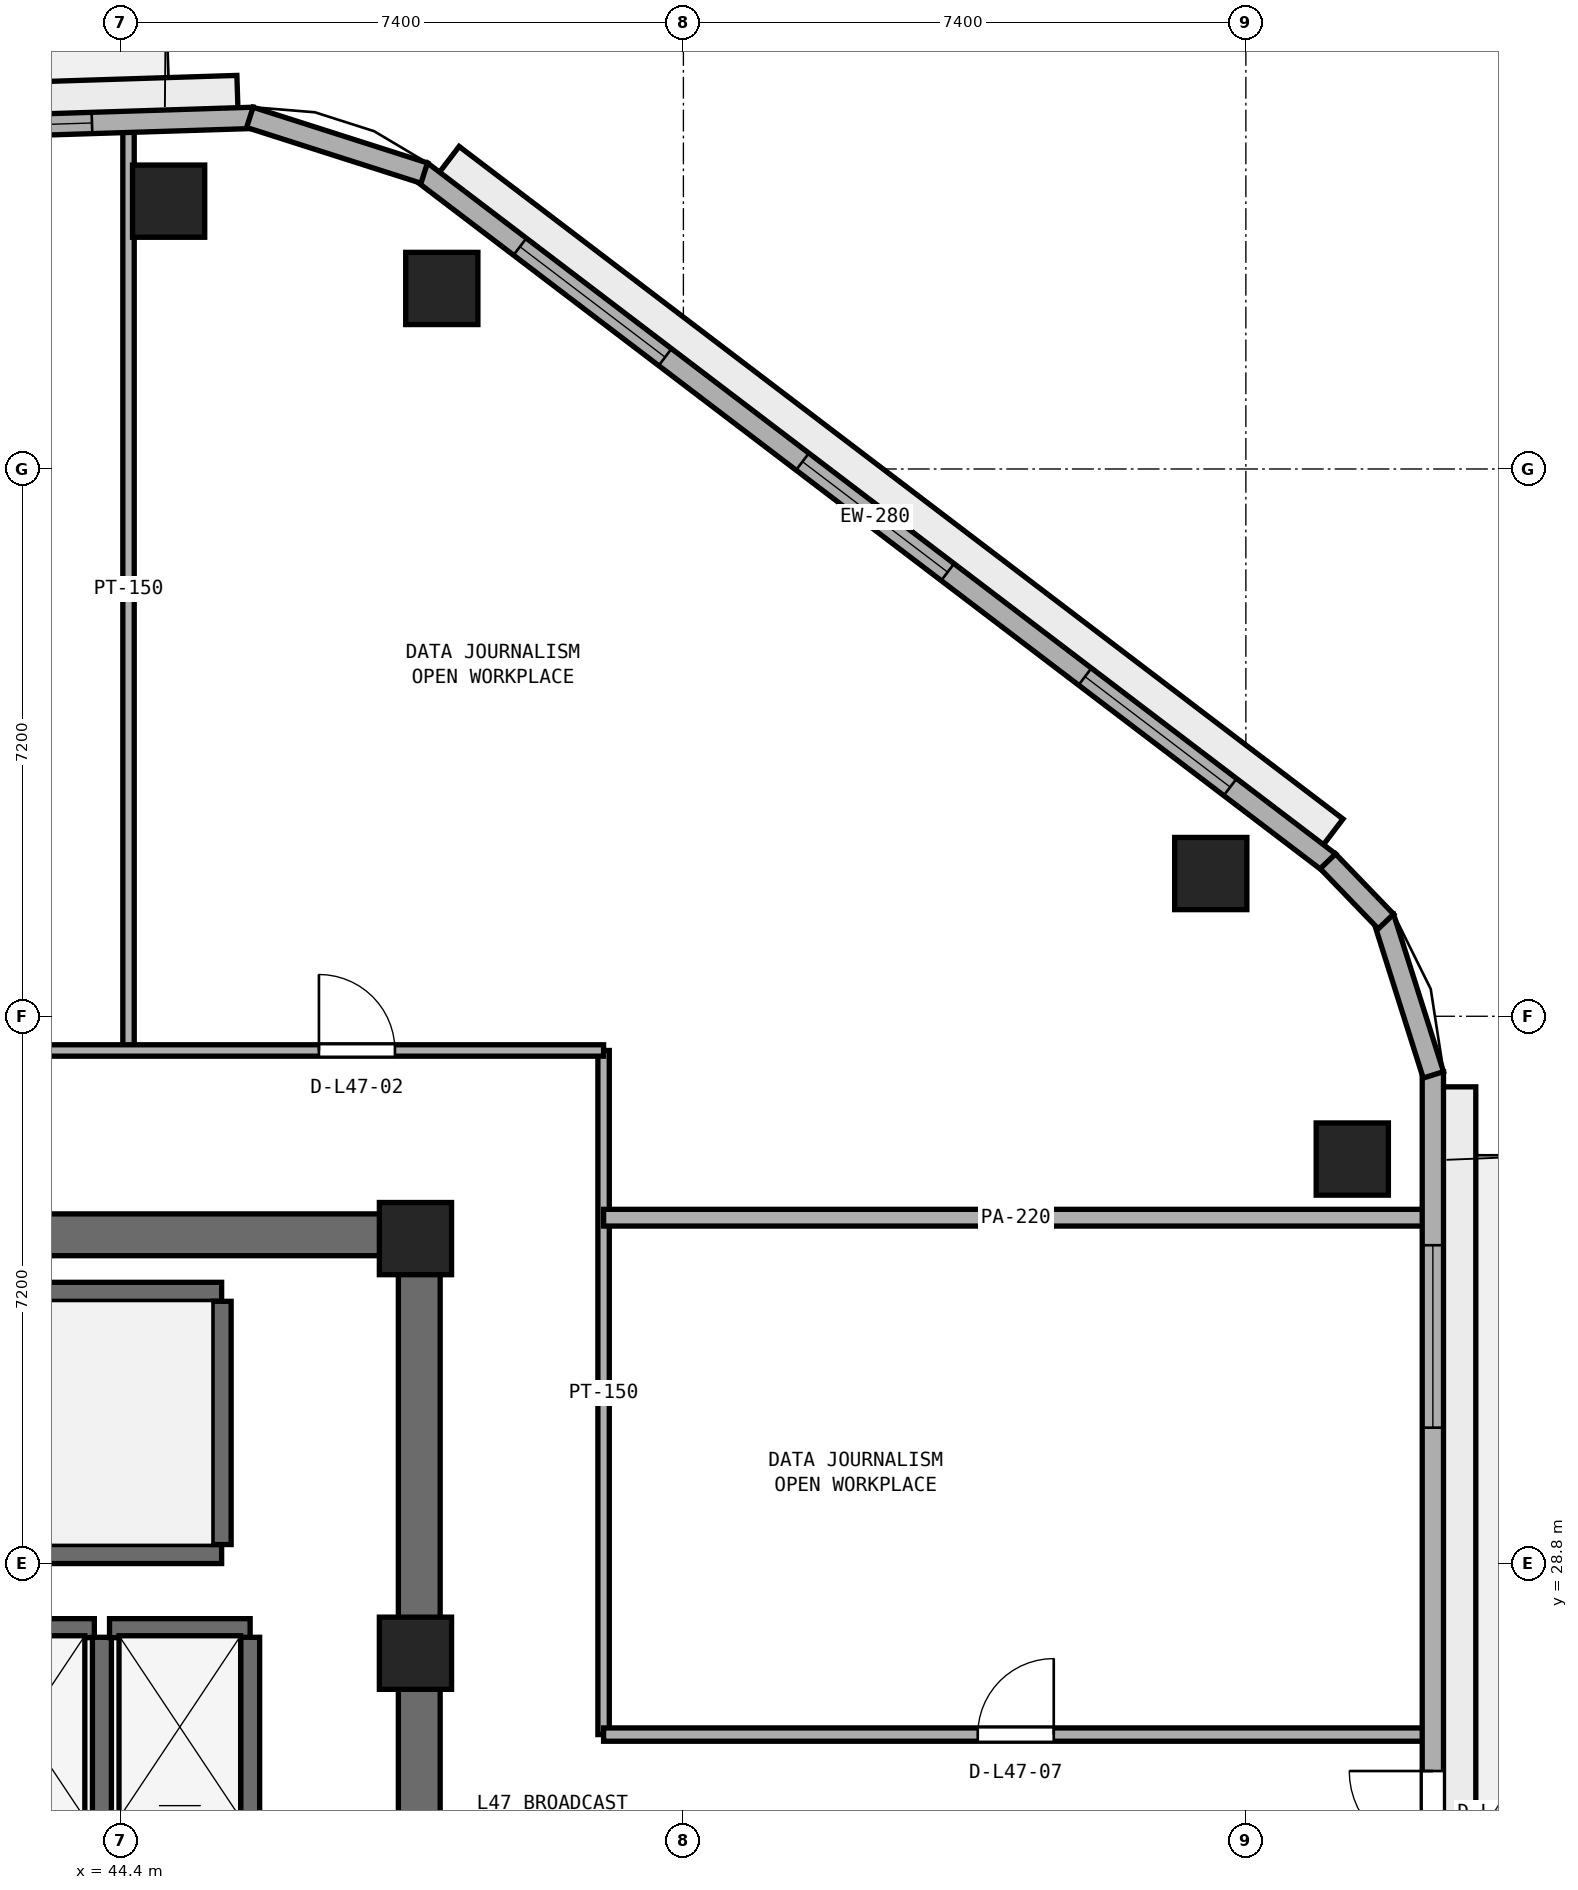
"""IFC4 building model, lengths in metres.
Left out: names, types, materials, properties, quantities, classifications, styles, units other than length and angle.
Written with IfcOpenShell. Run it as: python <this file> out.ifc"""

import sys

from ifc_helpers import new_model, si_unit, direction, frame, frame_2d, origin, origin_2d, place, context, subcontext, project, spatial, rectangle, extrude, element, fill, save


model = new_model("IFC4")
c1 = context("Model", 3, precision=1e-05, world=origin(), true_north=direction((0.0, 1.0)))
c2 = subcontext(c1, "Body", "Model", "MODEL_VIEW")
j1 = project(units=[si_unit("LENGTHUNIT", "METRE"), si_unit("PLANEANGLEUNIT", "RADIAN")], contexts=[c1])
p1 = place(None, origin())
s1 = spatial("IfcSite", under=j1, at=p1, CompositionType="ELEMENT")
p2 = place(p1, origin())
s2 = spatial("IfcBuilding", under=s1, at=p2, CompositionType="ELEMENT")
p3 = place(p2, frame((0.0, 0.0, 185.8)))
s3 = spatial("IfcBuildingStorey", under=s2, at=p3, CompositionType="ELEMENT", Elevation=185.8)
p4 = place(p3, frame((25.4, 33.125, 0.0), z_axis=(0.0, 0.0, 1.0), x_axis=(1.0, 0.0, 0.0)))
e1 = element("IfcWall", 1, at=p4, inside=s3, PredefinedType="SHEAR", context=c2, shape_type="SweptSolid", body=[
    extrude(rectangle(XDim=23.2, YDim=0.55, at=frame_2d((11.6, 0.0))), origin(), (0.0, 0.0, 1.0), 3.54),
])
p5 = place(p3, frame((48.325, 17.55, 0.0), z_axis=(0.0, 0.0, 1.0), x_axis=(0.0, 1.0, 0.0)))
e2 = element("IfcWall", 2, at=p5, inside=s3, PredefinedType="SHEAR", context=c2, shape_type="SweptSolid", body=[
    extrude(rectangle(XDim=15.3, YDim=0.55, at=frame_2d((7.65, 0.0))), origin(), (0.0, 0.0, 1.0), 3.54),
])
p6 = place(p5, frame((5.75, 0.0, 0.0)))
e3 = element("IfcOpeningElement", 3, at=p6, cuts=e2, PredefinedType="OPENING", context=c2, shape_type="SweptSolid", body=[
    extrude(rectangle(XDim=1.5, YDim=2.15, at=frame_2d((0.75, 1.075))), frame((0.0, 0.285, 0.0), z_axis=(0.0, -1.0, 0.0), x_axis=(1.0, 0.0, 0.0)), (0.0, 0.0, 1.0), 0.57),
])
for number, where, z_axis, x_axis in (
    (4, (48.275, 27.62, 0.0), (0.0, 0.0, 1.0), (1.0, 0.0, 0.0)),
    (5, (48.275, 33.075, 0.0), (0.0, 0.0, 1.0), (1.0, 0.0, 0.0)),
):
    element("IfcColumn", number, at=place(p3, frame(where, z_axis=z_axis, x_axis=x_axis)), inside=s3, PredefinedType="PILASTER", context=c2, shape_type="SweptSolid", body=[
        extrude(rectangle(XDim=0.95, YDim=0.95, at=origin_2d()), origin(), (0.0, 0.0, 1.0), 3.8),
    ])
for number, where, z_axis, x_axis in (
    (6, (60.6, 34.122, 0.0), (0.0, 0.0, 1.0), (1.0, 0.0, 0.0)),
    (7, (58.738, 37.878, 0.0), (0.0, 0.0, 1.0), (1.0, 0.0, 0.0)),
    (8, (48.622, 45.575, 0.0), (0.0, 0.0, 1.0), (1.0, 0.0, 0.0)),
    (9, (45.028, 46.724, 0.0), (0.0, 0.0, 1.0), (1.0, 0.0, 0.0)),
):
    element("IfcColumn", number, at=place(p3, frame(where, z_axis=z_axis, x_axis=x_axis)), inside=s3, PredefinedType="COLUMN", context=c2, shape_type="SweptSolid", body=[
        extrude(rectangle(XDim=0.95, YDim=0.95, at=origin_2d()), origin(), (0.0, 0.0, 1.0), 3.8),
    ])
for number, where, z_axis, x_axis in (
    (10, (38.425, 28.925, 0.0), (0.0, 0.0, 1.0), (1.0, 0.0, 0.0)),
    (11, (38.425, 32.375, 0.0), (0.0, 0.0, 1.0), (1.0, 0.0, 0.0)),
):
    element("IfcWall", number, at=place(p3, frame(where, z_axis=z_axis, x_axis=x_axis)), inside=s3, PredefinedType="SHEAR", context=c2, shape_type="SweptSolid", body=[
        extrude(rectangle(XDim=7.3, YDim=0.25, at=frame_2d((3.65, 0.0))), origin(), (0.0, 0.0, 1.0), 3.54),
    ])
p7 = place(p3, frame((45.725, 29.05, 0.0), z_axis=(0.0, 0.0, 1.0), x_axis=(0.0, 1.0, 0.0)))
e12 = element("IfcWall", 12, at=p7, inside=s3, PredefinedType="SHEAR", context=c2, shape_type="SweptSolid", body=[
    extrude(rectangle(XDim=3.2, YDim=0.25, at=frame_2d((1.6, 0.0))), origin(), (0.0, 0.0, 1.0), 3.54),
])
p8 = place(p3, frame((42.2, 27.95, 0.0), z_axis=(0.0, 0.0, 1.0), x_axis=(1.0, 0.0, 0.0)))
e13 = element("IfcWall", 13, at=p8, inside=s3, PredefinedType="SHEAR", context=c2, shape_type="SweptSolid", body=[
    extrude(rectangle(XDim=1.85, YDim=0.25, at=frame_2d((0.925, 0.0))), origin(), (0.0, 0.0, 1.0), 3.54),
])
p9 = place(p3, frame((44.15, 25.47, 0.0), z_axis=(0.0, 0.0, 1.0), x_axis=(0.0, 1.0, 0.0)))
e14 = element("IfcWall", 14, at=p9, inside=s3, PredefinedType="SHEAR", context=c2, shape_type="SweptSolid", body=[
    extrude(rectangle(XDim=2.36, YDim=0.25, at=frame_2d((1.18, 0.0))), origin(), (0.0, 0.0, 1.0), 3.54),
])
p10 = place(p3, frame((44.25, 27.95, 0.0), z_axis=(0.0, 0.0, 1.0), x_axis=(1.0, 0.0, 0.0)))
e15 = element("IfcWall", 15, at=p10, inside=s3, PredefinedType="SHEAR", context=c2, shape_type="SweptSolid", body=[
    extrude(rectangle(XDim=1.85, YDim=0.25, at=frame_2d((0.925, 0.0))), origin(), (0.0, 0.0, 1.0), 3.54),
])
p11 = place(p3, frame((46.1, 25.47, 0.0), z_axis=(0.0, 0.0, 1.0), x_axis=(0.0, 1.0, 0.0)))
e16 = element("IfcWall", 16, at=p11, inside=s3, PredefinedType="SHEAR", context=c2, shape_type="SweptSolid", body=[
    extrude(rectangle(XDim=2.36, YDim=0.25, at=frame_2d((1.18, 0.0))), origin(), (0.0, 0.0, 1.0), 3.54),
])
p12 = place(p3, frame((50.75, 26.55, 0.0), z_axis=(0.0, 0.0, 1.0), x_axis=(0.0, 1.0, 0.0)))
e17 = element("IfcWall", 17, at=p12, inside=s3, PredefinedType="PARTITIONING", context=c2, shape_type="SweptSolid", body=[
    extrude(rectangle(XDim=9.0, YDim=0.15, at=frame_2d((4.5, 0.0))), origin(), (0.0, 0.0, 1.0), 3.54),
])
p13 = place(p3, frame((44.5, 35.55, 0.0), z_axis=(0.0, 0.0, 1.0), x_axis=(0.0, 1.0, 0.0)))
e18 = element("IfcWall", 18, at=p13, inside=s3, PredefinedType="PARTITIONING", context=c2, shape_type="SweptSolid", body=[
    extrude(rectangle(XDim=12.152, YDim=0.15, at=frame_2d((6.076, 0.0))), origin(), (0.0, 0.0, 1.0), 3.54),
])
p14 = place(p3, frame((50.75, 26.55, 0.0), z_axis=(0.0, 0.0, 1.0), x_axis=(1.0, 0.0, 0.0)))
e19 = element("IfcWall", 19, at=p14, inside=s3, PredefinedType="PARTITIONING", context=c2, shape_type="SweptSolid", body=[
    extrude(rectangle(XDim=10.845, YDim=0.175, at=frame_2d((5.422, 0.0))), origin(), (0.0, 0.0, 1.0), 3.54),
])
p15 = place(p14, frame((4.923, 0.0, 0.0)))
e20 = element("IfcOpeningElement", 20, at=p15, cuts=e19, PredefinedType="OPENING", context=c2, shape_type="SweptSolid", body=[
    extrude(rectangle(XDim=1.0, YDim=2.12, at=frame_2d((0.5, 1.06))), frame((0.0, 0.097, 0.0), z_axis=(0.0, -1.0, 0.0), x_axis=(1.0, 0.0, 0.0)), (0.0, 0.0, 1.0), 0.195),
])
p16 = place(p3, frame((50.75, 33.35, 0.0), z_axis=(0.0, 0.0, 1.0), x_axis=(1.0, 0.0, 0.0)))
e21 = element("IfcWall", 21, at=p16, inside=s3, PredefinedType="PARTITIONING", context=c2, shape_type="SweptSolid", body=[
    extrude(rectangle(XDim=10.845, YDim=0.22, at=frame_2d((5.422, 0.0))), origin(), (0.0, 0.0, 1.0), 2.923),
])
p17 = place(p3, frame((23.25, 35.55, 0.0), z_axis=(0.0, 0.0, 1.0), x_axis=(1.0, 0.0, 0.0)))
e22 = element("IfcWall", 22, at=p17, inside=s3, PredefinedType="PARTITIONING", context=c2, shape_type="SweptSolid", body=[
    extrude(rectangle(XDim=27.5, YDim=0.15, at=frame_2d((13.75, 0.0))), origin(), (0.0, 0.0, 1.0), 3.54),
])
p18 = place(p17, frame((10.245, 0.0, 0.0)))
e23 = element("IfcOpeningElement", 23, at=p18, cuts=e22, PredefinedType="OPENING", context=c2, shape_type="SweptSolid", body=[
    extrude(rectangle(XDim=1.0, YDim=2.12, at=frame_2d((0.5, 1.06))), frame((0.0, 0.085, 0.0), z_axis=(0.0, -1.0, 0.0), x_axis=(1.0, 0.0, 0.0)), (0.0, 0.0, 1.0), 0.17),
])
p19 = place(p17, frame((23.755, 0.0, 0.0)))
e24 = element("IfcOpeningElement", 24, at=p19, cuts=e22, PredefinedType="OPENING", context=c2, shape_type="SweptSolid", body=[
    extrude(rectangle(XDim=1.0, YDim=2.12, at=frame_2d((0.5, 1.06))), frame((0.0, 0.085, 0.0), z_axis=(0.0, -1.0, 0.0), x_axis=(1.0, 0.0, 0.0)), (0.0, 0.0, 1.0), 0.17),
])
p20 = place(p3, frame((61.66, 16.369, 0.0), z_axis=(0.0, 0.0, 1.0), x_axis=(0.0, 1.0, 0.0)))
e25 = element("IfcWall", 25, at=p20, inside=s3, PredefinedType="STANDARD", context=c2, shape_type="SweptSolid", body=[
    extrude(rectangle(XDim=18.902, YDim=0.28, at=frame_2d((9.451, 0.0))), origin(), (0.0, 0.0, 1.0), 3.54),
])
p21 = place(p20, frame((8.601, 0.0, 0.0)))
e26 = element("IfcOpeningElement", 26, at=p21, cuts=e25, PredefinedType="OPENING", context=c2, shape_type="SweptSolid", body=[
    extrude(rectangle(XDim=1.1, YDim=2.2, at=frame_2d((0.55, 1.1))), frame((0.0, 0.15, 0.0), z_axis=(0.0, -1.0, 0.0), x_axis=(1.0, 0.0, 0.0)), (0.0, 0.0, 1.0), 0.3),
])
p22 = place(p20, frame((14.219, 0.0, 0.9)))
e27 = element("IfcOpeningElement", 27, at=p22, cuts=e25, PredefinedType="OPENING", context=c2, shape_type="SweptSolid", body=[
    extrude(rectangle(XDim=2.4, YDim=1.75, at=frame_2d((1.2, 0.875))), frame((0.0, 0.15, 0.0), z_axis=(0.0, -1.0, 0.0), x_axis=(1.0, 0.0, 0.0)), (0.0, 0.0, 1.0), 0.3),
])
p23 = place(p3, frame((60.295, 38.025, 0.0), z_axis=(0.0, 0.0, 1.0), x_axis=(-0.795831760834, 0.605517801925, 0.0)))
e28 = element("IfcWall", 28, at=p23, inside=s3, PredefinedType="STANDARD", context=c2, shape_type="SweptSolid", body=[
    extrude(rectangle(XDim=15.012, YDim=0.28, at=frame_2d((7.506, 0.0))), origin(), (0.0, 0.0, 1.0), 3.54),
])
p24 = place(p23, frame((1.635, 0.0, 0.9)))
e29 = element("IfcOpeningElement", 29, at=p24, cuts=e28, PredefinedType="OPENING", context=c2, shape_type="SweptSolid", body=[
    extrude(rectangle(XDim=2.4, YDim=1.75, at=frame_2d((1.2, 0.875))), frame((0.0, 0.15, 0.0), z_axis=(0.0, -1.0, 0.0), x_axis=(1.0, 0.0, 0.0)), (0.0, 0.0, 1.0), 0.3),
])
p25 = place(p23, frame((6.306, 0.0, 0.9)))
e30 = element("IfcOpeningElement", 30, at=p25, cuts=e28, PredefinedType="OPENING", context=c2, shape_type="SweptSolid", body=[
    extrude(rectangle(XDim=2.4, YDim=1.75, at=frame_2d((1.2, 0.875))), frame((0.0, 0.15, 0.0), z_axis=(0.0, -1.0, 0.0), x_axis=(1.0, 0.0, 0.0)), (0.0, 0.0, 1.0), 0.3),
])
p26 = place(p23, frame((10.977, 0.0, 0.9)))
e31 = element("IfcOpeningElement", 31, at=p26, cuts=e28, PredefinedType="OPENING", context=c2, shape_type="SweptSolid", body=[
    extrude(rectangle(XDim=2.4, YDim=1.75, at=frame_2d((1.2, 0.875))), frame((0.0, 0.15, 0.0), z_axis=(0.0, -1.0, 0.0), x_axis=(1.0, 0.0, 0.0)), (0.0, 0.0, 1.0), 0.3),
])
p27 = place(p3, frame((46.143, 47.82, 0.0), z_axis=(0.0, 0.0, 1.0), x_axis=(-0.999497065256, -0.031711457627, 0.0)))
e32 = element("IfcWall", 32, at=p27, inside=s3, PredefinedType="STANDARD", context=c2, shape_type="SweptSolid", body=[
    extrude(rectangle(XDim=16.452, YDim=0.28, at=frame_2d((8.226, 0.0))), origin(), (0.0, 0.0, 1.0), 3.54),
])
p28 = place(p27, frame((7.676, 0.0, 0.0)))
e33 = element("IfcOpeningElement", 33, at=p28, cuts=e32, PredefinedType="OPENING", context=c2, shape_type="SweptSolid", body=[
    extrude(rectangle(XDim=1.1, YDim=2.2, at=frame_2d((0.55, 1.1))), frame((0.0, 0.15, 0.0), z_axis=(0.0, -1.0, 0.0), x_axis=(1.0, 0.0, 0.0)), (0.0, 0.0, 1.0), 0.3),
])
p29 = place(p27, frame((2.125, 0.0, 0.9)))
e34 = element("IfcOpeningElement", 34, at=p29, cuts=e32, PredefinedType="OPENING", context=c2, shape_type="SweptSolid", body=[
    extrude(rectangle(XDim=2.4, YDim=1.75, at=frame_2d((1.2, 0.875))), frame((0.0, 0.15, 0.0), z_axis=(0.0, -1.0, 0.0), x_axis=(1.0, 0.0, 0.0)), (0.0, 0.0, 1.0), 0.3),
])
p30 = place(p27, frame((12.177, 0.0, 0.9)))
e35 = element("IfcOpeningElement", 35, at=p30, cuts=e32, PredefinedType="OPENING", context=c2, shape_type="SweptSolid", body=[
    extrude(rectangle(XDim=2.4, YDim=1.75, at=frame_2d((1.2, 0.875))), frame((0.0, 0.15, 0.0), z_axis=(0.0, -1.0, 0.0), x_axis=(1.0, 0.0, 0.0)), (0.0, 0.0, 1.0), 0.3),
])
p31 = place(p3, frame((61.667, 35.229, 0.0), z_axis=(0.0, 0.0, 1.0), x_axis=(-0.302044777107, 0.953293738898, 0.0)))
e36 = element("IfcWall", 36, at=p31, inside=s3, PredefinedType="STANDARD", context=c2, shape_type="SweptSolid", body=[
    extrude(rectangle(XDim=2.174, YDim=0.28, at=frame_2d((1.087, 0.0))), origin(), (0.0, 0.0, 1.0), 3.54),
])
p32 = place(p3, frame((61.042, 37.247, 0.0), z_axis=(0.0, 0.0, 1.0), x_axis=(-0.694004126367, 0.719971022045, 0.0)))
e37 = element("IfcWall", 37, at=p32, inside=s3, PredefinedType="STANDARD", context=c2, shape_type="SweptSolid", body=[
    extrude(rectangle(XDim=1.1, YDim=0.28, at=frame_2d((0.55, 0.0))), origin(), (0.0, 0.0, 1.0), 3.54),
])
p33 = place(p3, frame((48.39, 47.093, 0.0), z_axis=(0.0, 0.0, 1.0), x_axis=(-0.952542948918, 0.304404222156, 0.0)))
e38 = element("IfcWall", 38, at=p33, inside=s3, PredefinedType="STANDARD", context=c2, shape_type="SweptSolid", body=[
    extrude(rectangle(XDim=2.408, YDim=0.28, at=frame_2d((1.204, 0.0))), origin(), (0.0, 0.0, 1.0), 3.54),
])
p34 = place(p19, origin())
e39 = element("IfcDoor", 39, at=p34, inside=s3, OperationType="SINGLE_SWING_LEFT", PredefinedType="DOOR", context=c2, shape_type="SweptSolid", body=[
    extrude(rectangle(XDim=1.0, YDim=2.12, at=frame_2d((0.5, 1.06))), frame((0.0, 0.025, 0.0), z_axis=(0.0, -1.0, 0.0), x_axis=(1.0, 0.0, 0.0)), (0.0, 0.0, 1.0), 0.05),
])
fill(e24, e39)
p35 = place(p15, origin())
e40 = element("IfcDoor", 40, at=p35, inside=s3, OperationType="SINGLE_SWING_RIGHT", PredefinedType="DOOR", context=c2, shape_type="SweptSolid", body=[
    extrude(rectangle(XDim=1.0, YDim=2.12, at=frame_2d((0.5, 1.06))), frame((0.0, 0.025, 0.0), z_axis=(0.0, -1.0, 0.0), x_axis=(1.0, 0.0, 0.0)), (0.0, 0.0, 1.0), 0.05),
])
fill(e20, e40)
p36 = place(p21, origin())
e41 = element("IfcDoor", 41, at=p36, inside=s3, OperationType="SINGLE_SWING_RIGHT", PredefinedType="DOOR", context=c2, shape_type="SweptSolid", body=[
    extrude(rectangle(XDim=1.1, YDim=2.2, at=frame_2d((0.55, 1.1))), frame((0.0, 0.025, 0.0), z_axis=(0.0, -1.0, 0.0), x_axis=(1.0, 0.0, 0.0)), (0.0, 0.0, 1.0), 0.05),
])
fill(e26, e41)
p37 = place(p22, origin())
e42 = element("IfcWindow", 42, at=p37, inside=s3, PartitioningType="SINGLE_PANEL", PredefinedType="WINDOW", context=c2, shape_type="SweptSolid", body=[
    extrude(rectangle(XDim=2.4, YDim=1.75, at=frame_2d((1.2, 0.875))), frame((0.0, 0.03, 0.0), z_axis=(0.0, -1.0, 0.0), x_axis=(1.0, 0.0, 0.0)), (0.0, 0.0, 1.0), 0.06),
])
fill(e27, e42)
p38 = place(p24, origin())
e43 = element("IfcWindow", 43, at=p38, inside=s3, PartitioningType="SINGLE_PANEL", PredefinedType="WINDOW", context=c2, shape_type="SweptSolid", body=[
    extrude(rectangle(XDim=2.4, YDim=1.75, at=frame_2d((1.2, 0.875))), frame((0.0, 0.03, 0.0), z_axis=(0.0, -1.0, 0.0), x_axis=(1.0, 0.0, 0.0)), (0.0, 0.0, 1.0), 0.06),
])
fill(e29, e43)
p39 = place(p25, origin())
e44 = element("IfcWindow", 44, at=p39, inside=s3, PartitioningType="SINGLE_PANEL", PredefinedType="WINDOW", context=c2, shape_type="SweptSolid", body=[
    extrude(rectangle(XDim=2.4, YDim=1.75, at=frame_2d((1.2, 0.875))), frame((0.0, 0.03, 0.0), z_axis=(0.0, -1.0, 0.0), x_axis=(1.0, 0.0, 0.0)), (0.0, 0.0, 1.0), 0.06),
])
fill(e30, e44)
p40 = place(p26, origin())
e45 = element("IfcWindow", 45, at=p40, inside=s3, PartitioningType="SINGLE_PANEL", PredefinedType="WINDOW", context=c2, shape_type="SweptSolid", body=[
    extrude(rectangle(XDim=2.4, YDim=1.75, at=frame_2d((1.2, 0.875))), frame((0.0, 0.03, 0.0), z_axis=(0.0, -1.0, 0.0), x_axis=(1.0, 0.0, 0.0)), (0.0, 0.0, 1.0), 0.06),
])
fill(e31, e45)
p41 = place(p29, origin())
e46 = element("IfcWindow", 46, at=p41, inside=s3, PartitioningType="SINGLE_PANEL", PredefinedType="WINDOW", context=c2, shape_type="SweptSolid", body=[
    extrude(rectangle(XDim=2.4, YDim=1.75, at=frame_2d((1.2, 0.875))), frame((0.0, 0.03, 0.0), z_axis=(0.0, -1.0, 0.0), x_axis=(1.0, 0.0, 0.0)), (0.0, 0.0, 1.0), 0.06),
])
fill(e34, e46)
save(model, sys.argv[1])
